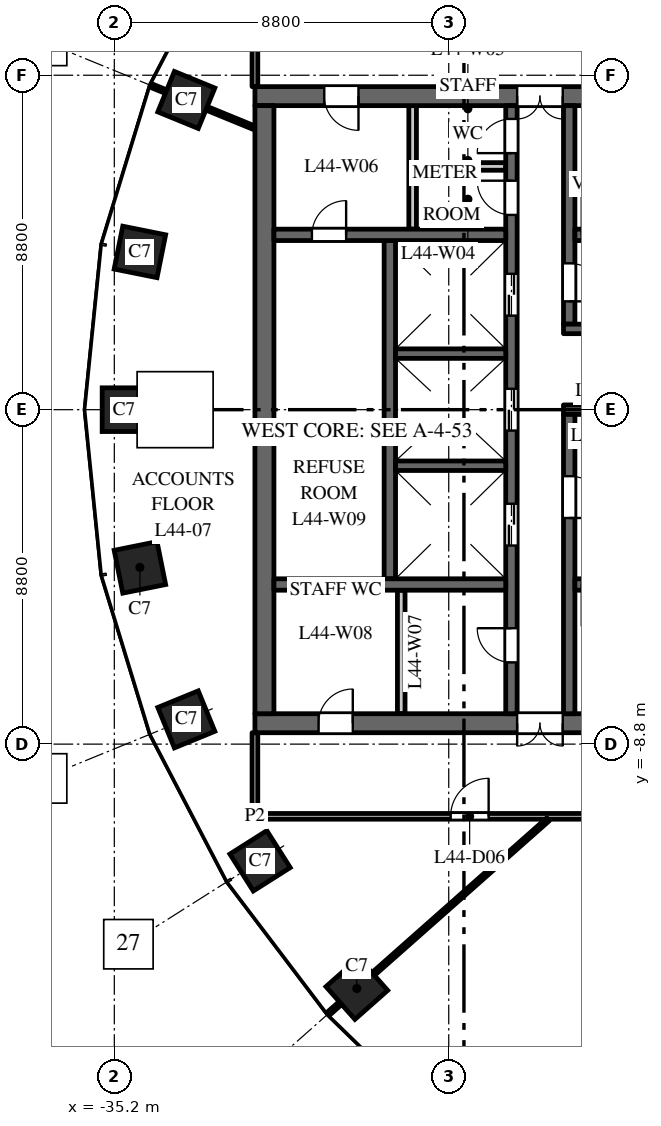
"""IFC4 building model, lengths in metres.
Left out: names, types, materials, properties, quantities, classifications, styles, units other than length and angle.
Written with IfcOpenShell. Run it as: python <this file> out.ifc"""

import sys

from ifc_helpers import new_model, si_unit, direction, frame, frame_2d, origin, origin_2d, place, context, subcontext, project, spatial, rectangle, extrude, element, fill, save


model = new_model("IFC4")
c1 = context("Model", 3, precision=1e-05, world=origin(), true_north=direction((0.0, 1.0)))
c2 = subcontext(c1, "Body", "Model", "MODEL_VIEW")
j1 = project(units=[si_unit("LENGTHUNIT", "METRE"), si_unit("PLANEANGLEUNIT", "RADIAN")], contexts=[c1])
p1 = place(None, origin())
s1 = spatial("IfcSite", under=j1, at=p1, CompositionType="ELEMENT")
p2 = place(p1, origin())
s2 = spatial("IfcBuilding", under=s1, at=p2, CompositionType="ELEMENT")
p3 = place(p2, frame((0.0, 0.0, 190.0)))
s3 = spatial("IfcBuildingStorey", under=s2, at=p3, CompositionType="ELEMENT", Elevation=190.0)
for number, where, z_axis, x_axis in (
    (1, (-33.305, 8.149, 0.0), (0.0, 0.0, 1.0), (-0.379, -0.925, 0.0)),
    (2, (-34.527, 4.151, 0.0), (0.0, 0.0, 1.0), (-0.197, -0.98, 0.0)),
    (3, (-34.945, 0.0, 0.0), (0.0, 0.0, 1.0), (0.0, -1.0, 0.0)),
    (4, (-34.527, -4.151, 0.0), (0.0, 0.0, 1.0), (0.197, -0.98, 0.0)),
    (5, (-33.305, -8.149, 0.0), (0.0, 0.0, 1.0), (0.379, -0.925, 0.0)),
    (6, (-31.365, -11.871, 0.0), (0.0, 0.0, 1.0), (0.535, -0.845, 0.0)),
    (7, (-28.819, -15.23, 0.0), (0.0, 0.0, 1.0), (0.663, -0.749, 0.0)),
):
    element("IfcColumn", number, at=place(p3, frame(where, z_axis=z_axis, x_axis=x_axis)), inside=s3, PredefinedType="COLUMN", context=c2, shape_type="SweptSolid", body=[
        extrude(rectangle(XDim=1.15, YDim=1.15, at=origin_2d()), origin(), (0.0, 0.0, 1.0), 4.0),
    ])
p4 = place(p3, frame((-16.5, 8.25, 0.0), z_axis=(0.0, 0.0, 1.0), x_axis=(-1.0, 0.0, 0.0)))
e8 = element("IfcWall", 8, at=p4, inside=s3, PredefinedType="SHEAR", context=c2, shape_type="SweptSolid", body=[
    extrude(rectangle(XDim=15.0, YDim=0.5, at=frame_2d((7.5, 0.0))), origin(), (0.0, 0.0, 1.0), 3.7),
])
p5 = place(p4, frame((6.9, 0.0, 0.0)))
e9 = element("IfcOpeningElement", 9, at=p5, cuts=e8, PredefinedType="OPENING", context=c2, shape_type="SweptSolid", body=[
    extrude(rectangle(XDim=1.2, YDim=2.1, at=frame_2d((0.6, 1.05))), frame((0.0, 0.26, 0.0), z_axis=(0.0, -1.0, 0.0), x_axis=(1.0, 0.0, 0.0)), (0.0, 0.0, 1.0), 0.52),
])
p6 = place(p4, frame((12.275, 0.0, 0.0)))
e10 = element("IfcOpeningElement", 10, at=p6, cuts=e8, PredefinedType="OPENING", context=c2, shape_type="SweptSolid", body=[
    extrude(rectangle(XDim=0.9, YDim=2.1, at=frame_2d((0.45, 1.05))), frame((0.0, 0.26, 0.0), z_axis=(0.0, -1.0, 0.0), x_axis=(1.0, 0.0, 0.0)), (0.0, 0.0, 1.0), 0.52),
])
p7 = place(p3, frame((-16.5, -8.25, 0.0), z_axis=(0.0, 0.0, 1.0), x_axis=(-1.0, 0.0, 0.0)))
e11 = element("IfcWall", 11, at=p7, inside=s3, PredefinedType="SHEAR", context=c2, shape_type="SweptSolid", body=[
    extrude(rectangle(XDim=15.0, YDim=0.5, at=frame_2d((7.5, 0.0))), origin(), (0.0, 0.0, 1.0), 3.7),
])
p8 = place(p7, frame((6.9, 0.0, 0.0)))
e12 = element("IfcOpeningElement", 12, at=p8, cuts=e11, PredefinedType="OPENING", context=c2, shape_type="SweptSolid", body=[
    extrude(rectangle(XDim=1.2, YDim=2.1, at=frame_2d((0.6, 1.05))), frame((0.0, 0.26, 0.0), z_axis=(0.0, -1.0, 0.0), x_axis=(1.0, 0.0, 0.0)), (0.0, 0.0, 1.0), 0.52),
])
p9 = place(p7, frame((12.425, 0.0, 0.0)))
e13 = element("IfcOpeningElement", 13, at=p9, cuts=e11, PredefinedType="OPENING", context=c2, shape_type="SweptSolid", body=[
    extrude(rectangle(XDim=0.9, YDim=2.1, at=frame_2d((0.45, 1.05))), frame((0.0, 0.26, 0.0), z_axis=(0.0, -1.0, 0.0), x_axis=(1.0, 0.0, 0.0)), (0.0, 0.0, 1.0), 0.52),
])
p10 = place(p3, frame((-27.95, -4.45, 0.0), z_axis=(0.0, 0.0, 1.0), x_axis=(0.0, 1.0, 0.0)))
e14 = element("IfcWall", 14, at=p10, inside=s3, PredefinedType="SHEAR", context=c2, shape_type="SweptSolid", body=[
    extrude(rectangle(XDim=8.9, YDim=0.3, at=frame_2d((4.45, 0.0))), origin(), (0.0, 0.0, 1.0), 3.7),
])
p11 = place(p3, frame((-24.75, -8.0, 0.0), z_axis=(0.0, 0.0, 1.0), x_axis=(0.0, 1.0, 0.0)))
e15 = element("IfcWall", 15, at=p11, inside=s3, PredefinedType="SHEAR", context=c2, shape_type="SweptSolid", body=[
    extrude(rectangle(XDim=16.0, YDim=0.3, at=frame_2d((8.0, 0.0))), origin(), (0.0, 0.0, 1.0), 3.7),
])
p12 = place(p11, frame((4.425, 0.0, 0.0)))
e16 = element("IfcOpeningElement", 16, at=p12, cuts=e15, PredefinedType="OPENING", context=c2, shape_type="SweptSolid", body=[
    extrude(rectangle(XDim=1.1, YDim=2.1, at=frame_2d((0.55, 1.05))), frame((0.0, 0.16, 0.0), z_axis=(0.0, -1.0, 0.0), x_axis=(1.0, 0.0, 0.0)), (0.0, 0.0, 1.0), 0.32),
])
p13 = place(p11, frame((7.45, 0.0, 0.0)))
e17 = element("IfcOpeningElement", 17, at=p13, cuts=e15, PredefinedType="OPENING", context=c2, shape_type="SweptSolid", body=[
    extrude(rectangle(XDim=1.1, YDim=2.1, at=frame_2d((0.55, 1.05))), frame((0.0, 0.16, 0.0), z_axis=(0.0, -1.0, 0.0), x_axis=(1.0, 0.0, 0.0)), (0.0, 0.0, 1.0), 0.32),
])
p14 = place(p11, frame((10.475, 0.0, 0.0)))
e18 = element("IfcOpeningElement", 18, at=p14, cuts=e15, PredefinedType="OPENING", context=c2, shape_type="SweptSolid", body=[
    extrude(rectangle(XDim=1.1, YDim=2.1, at=frame_2d((0.55, 1.05))), frame((0.0, 0.16, 0.0), z_axis=(0.0, -1.0, 0.0), x_axis=(1.0, 0.0, 0.0)), (0.0, 0.0, 1.0), 0.32),
])
p15 = place(p11, frame((13.125, 0.0, 0.0)))
e19 = element("IfcOpeningElement", 19, at=p15, cuts=e15, PredefinedType="OPENING", context=c2, shape_type="SweptSolid", body=[
    extrude(rectangle(XDim=0.9, YDim=2.1, at=frame_2d((0.45, 1.05))), frame((0.0, 0.16, 0.0), z_axis=(0.0, -1.0, 0.0), x_axis=(1.0, 0.0, 0.0)), (0.0, 0.0, 1.0), 0.32),
])
p16 = place(p11, frame((14.75, 0.0, 0.0)))
e20 = element("IfcOpeningElement", 20, at=p16, cuts=e15, PredefinedType="OPENING", context=c2, shape_type="SweptSolid", body=[
    extrude(rectangle(XDim=0.9, YDim=2.1, at=frame_2d((0.45, 1.05))), frame((0.0, 0.16, 0.0), z_axis=(0.0, -1.0, 0.0), x_axis=(1.0, 0.0, 0.0)), (0.0, 0.0, 1.0), 0.32),
])
p17 = place(p11, frame((1.35, 0.0, 0.0)))
e21 = element("IfcOpeningElement", 21, at=p17, cuts=e15, PredefinedType="OPENING", context=c2, shape_type="SweptSolid", body=[
    extrude(rectangle(XDim=0.9, YDim=2.1, at=frame_2d((0.45, 1.05))), frame((0.0, 0.16, 0.0), z_axis=(0.0, -1.0, 0.0), x_axis=(1.0, 0.0, 0.0)), (0.0, 0.0, 1.0), 0.32),
])
p18 = place(p3, frame((-20.1, 0.0, 0.0), z_axis=(0.0, 0.0, 1.0), x_axis=(-1.0, 0.0, 0.0)))
e22 = element("IfcWall", 22, at=p18, inside=s3, PredefinedType="SHEAR", context=c2, shape_type="SweptSolid", body=[
    extrude(rectangle(XDim=3.28, YDim=0.25, at=frame_2d((1.64, 0.0))), origin(), (0.0, 0.0, 1.0), 3.7),
])
p19 = place(p3, frame((-31.25, -8.0, 0.0), z_axis=(0.0, 0.0, 1.0), x_axis=(0.0, 1.0, 0.0)))
e23 = element("IfcWall", 23, at=p19, inside=s3, PredefinedType="SHEAR", context=c2, shape_type="SweptSolid", body=[
    extrude(rectangle(XDim=16.0, YDim=0.5, at=frame_2d((8.0, 0.0))), origin(), (0.0, 0.0, 1.0), 3.7),
])
p20 = place(p3, frame((-24.9, 4.6, 0.0), z_axis=(0.0, 0.0, 1.0), x_axis=(-1.0, 0.0, 0.0)))
e24 = element("IfcWall", 24, at=p20, inside=s3, PredefinedType="SHEAR", context=c2, shape_type="SweptSolid", body=[
    extrude(rectangle(XDim=6.1, YDim=0.3, at=frame_2d((3.05, 0.0))), origin(), (0.0, 0.0, 1.0), 3.7),
])
p21 = place(p20, frame((4.2, 0.0, 0.0)))
e25 = element("IfcOpeningElement", 25, at=p21, cuts=e24, PredefinedType="OPENING", context=c2, shape_type="SweptSolid", body=[
    extrude(rectangle(XDim=0.9, YDim=2.1, at=frame_2d((0.45, 1.05))), frame((0.0, 0.16, 0.0), z_axis=(0.0, -1.0, 0.0), x_axis=(1.0, 0.0, 0.0)), (0.0, 0.0, 1.0), 0.32),
])
for number, where, z_axis, x_axis in (
    (26, (-27.35, 4.75, 0.0), (0.0, 0.0, 1.0), (0.0, 1.0, 0.0)),
    (27, (-27.65, -8.0, 0.0), (0.0, 0.0, 1.0), (0.0, 1.0, 0.0)),
):
    element("IfcWall", number, at=place(p3, frame(where, z_axis=z_axis, x_axis=x_axis)), inside=s3, PredefinedType="PARTITIONING", context=c2, shape_type="SweptSolid", body=[
        extrude(rectangle(XDim=3.25, YDim=0.2, at=frame_2d((1.625, 0.0))), origin(), (0.0, 0.0, 1.0), 3.7),
    ])
p22 = place(p3, frame((-24.9, 6.4, 0.0), z_axis=(0.0, 0.0, 1.0), x_axis=(-1.0, 0.0, 0.0)))
e28 = element("IfcWall", 28, at=p22, inside=s3, PredefinedType="PARTITIONING", context=c2, shape_type="SweptSolid", body=[
    extrude(rectangle(XDim=2.35, YDim=0.2, at=frame_2d((1.175, 0.0))), origin(), (0.0, 0.0, 1.0), 3.7),
])
p23 = place(p3, frame((-24.9, -4.6, 0.0), z_axis=(0.0, 0.0, 1.0), x_axis=(-1.0, 0.0, 0.0)))
e29 = element("IfcWall", 29, at=p23, inside=s3, PredefinedType="SHEAR", context=c2, shape_type="SweptSolid", body=[
    extrude(rectangle(XDim=6.1, YDim=0.3, at=frame_2d((3.05, 0.0))), origin(), (0.0, 0.0, 1.0), 3.7),
])
for number, where, z_axis, x_axis in (
    (30, (-24.9, -1.475, 0.0), (0.0, 0.0, 1.0), (-1.0, 0.0, 0.0)),
    (31, (-24.9, 1.475, 0.0), (0.0, 0.0, 1.0), (-1.0, 0.0, 0.0)),
):
    element("IfcWall", number, at=place(p3, frame(where, z_axis=z_axis, x_axis=x_axis)), inside=s3, PredefinedType="SHEAR", context=c2, shape_type="SweptSolid", body=[
        extrude(rectangle(XDim=2.9, YDim=0.25, at=frame_2d((1.45, 0.0))), origin(), (0.0, 0.0, 1.0), 3.7),
    ])
p24 = place(p3, frame((-23.23, 2.25, 0.0), z_axis=(0.0, 0.0, 1.0), x_axis=(0.0, 1.0, 0.0)))
e32 = element("IfcWall", 32, at=p24, inside=s3, PredefinedType="SHEAR", context=c2, shape_type="SweptSolid", body=[
    extrude(rectangle(XDim=5.75, YDim=0.3, at=frame_2d((2.875, 0.0))), origin(), (0.0, 0.0, 1.0), 3.7),
])
p25 = place(p24, frame((0.6, 0.0, 0.0)))
e33 = element("IfcOpeningElement", 33, at=p25, cuts=e32, PredefinedType="OPENING", context=c2, shape_type="SweptSolid", body=[
    extrude(rectangle(XDim=1.0, YDim=2.1, at=frame_2d((0.5, 1.05))), frame((0.0, 0.16, 0.0), z_axis=(0.0, -1.0, 0.0), x_axis=(1.0, 0.0, 0.0)), (0.0, 0.0, 1.0), 0.32),
])
p26 = place(p3, frame((-23.23, -8.0, 0.0), z_axis=(0.0, 0.0, 1.0), x_axis=(0.0, 1.0, 0.0)))
e34 = element("IfcWall", 34, at=p26, inside=s3, PredefinedType="SHEAR", context=c2, shape_type="SweptSolid", body=[
    extrude(rectangle(XDim=7.875, YDim=0.3, at=frame_2d((3.938, 0.0))), origin(), (0.0, 0.0, 1.0), 3.7),
])
p27 = place(p26, frame((5.15, 0.0, 0.0)))
e35 = element("IfcOpeningElement", 35, at=p27, cuts=e34, PredefinedType="OPENING", context=c2, shape_type="SweptSolid", body=[
    extrude(rectangle(XDim=1.1, YDim=2.1, at=frame_2d((0.55, 1.05))), frame((0.0, 0.16, 0.0), z_axis=(0.0, -1.0, 0.0), x_axis=(1.0, 0.0, 0.0)), (0.0, 0.0, 1.0), 0.32),
])
p28 = place(p3, frame((-16.9, 4.6, 0.0), z_axis=(0.0, 0.0, 1.0), x_axis=(-1.0, 0.0, 0.0)))
e36 = element("IfcWall", 36, at=p28, inside=s3, PredefinedType="SHEAR", context=c2, shape_type="SweptSolid", body=[
    extrude(rectangle(XDim=6.18, YDim=0.3, at=frame_2d((3.09, 0.0))), origin(), (0.0, 0.0, 1.0), 3.7),
])
p29 = place(p28, frame((4.9, 0.0, 0.0)))
e37 = element("IfcOpeningElement", 37, at=p29, cuts=e36, PredefinedType="OPENING", context=c2, shape_type="SweptSolid", body=[
    extrude(rectangle(XDim=1.1, YDim=2.1, at=frame_2d((0.55, 1.05))), frame((0.0, 0.16, 0.0), z_axis=(0.0, -1.0, 0.0), x_axis=(1.0, 0.0, 0.0)), (0.0, 0.0, 1.0), 0.32),
])
p30 = place(p3, frame((-16.9, -4.6, 0.0), z_axis=(0.0, 0.0, 1.0), x_axis=(-1.0, 0.0, 0.0)))
e38 = element("IfcWall", 38, at=p30, inside=s3, PredefinedType="SHEAR", context=c2, shape_type="SweptSolid", body=[
    extrude(rectangle(XDim=6.18, YDim=0.3, at=frame_2d((3.09, 0.0))), origin(), (0.0, 0.0, 1.0), 3.7),
])
p31 = place(p30, frame((4.9, 0.0, 0.0)))
e39 = element("IfcOpeningElement", 39, at=p31, cuts=e38, PredefinedType="OPENING", context=c2, shape_type="SweptSolid", body=[
    extrude(rectangle(XDim=1.1, YDim=2.1, at=frame_2d((0.55, 1.05))), frame((0.0, 0.16, 0.0), z_axis=(0.0, -1.0, 0.0), x_axis=(1.0, 0.0, 0.0)), (0.0, 0.0, 1.0), 0.32),
])
p32 = place(p3, frame((-20.85, 2.125, 0.0), z_axis=(0.0, 0.0, 1.0), x_axis=(-1.0, 0.0, 0.0)))
e40 = element("IfcWall", 40, at=p32, inside=s3, PredefinedType="SHEAR", context=c2, shape_type="SweptSolid", body=[
    extrude(rectangle(XDim=2.53, YDim=0.25, at=frame_2d((1.265, 0.0))), origin(), (0.0, 0.0, 1.0), 3.7),
])
p33 = place(p3, frame((-34.234, 8.53, 0.0), z_axis=(0.0, 0.0, 1.0), x_axis=(0.925344112436, -0.379128307542, 0.0)))
e41 = element("IfcWall", 41, at=p33, inside=s3, PredefinedType="PARTITIONING", context=c2, shape_type="SweptSolid", body=[
    extrude(rectangle(XDim=2.954, YDim=0.1, at=frame_2d((1.477, 0.0))), origin(), (0.0, 0.0, 1.0), 2.9),
])
p34 = place(p3, frame((-31.5, -10.7, 0.0), z_axis=(0.0, 0.0, 1.0), x_axis=(0.0, 1.0, 0.0)))
e42 = element("IfcWall", 42, at=p34, inside=s3, PredefinedType="PARTITIONING", context=c2, shape_type="SweptSolid", body=[
    extrude(rectangle(XDim=2.2, YDim=0.15, at=frame_2d((1.1, 0.0))), origin(), (0.0, 0.0, 1.0), 3.7),
])
p35 = place(p3, frame((-31.5, -10.7, 0.0), z_axis=(0.0, 0.0, 1.0), x_axis=(1.0, 0.0, 0.0)))
e43 = element("IfcWall", 43, at=p35, inside=s3, PredefinedType="PARTITIONING", context=c2, shape_type="SweptSolid", body=[
    extrude(rectangle(XDim=15.0, YDim=0.15, at=frame_2d((7.5, 0.0))), origin(), (0.0, 0.0, 1.0), 3.1),
])
p36 = place(p35, frame((5.15, 0.0, 0.0)))
e44 = element("IfcOpeningElement", 44, at=p36, cuts=e43, PredefinedType="OPENING", context=c2, shape_type="SweptSolid", body=[
    extrude(rectangle(XDim=1.0, YDim=2.1, at=frame_2d((0.5, 1.05))), frame((0.0, 0.085, 0.0), z_axis=(0.0, -1.0, 0.0), x_axis=(1.0, 0.0, 0.0)), (0.0, 0.0, 1.0), 0.17),
])
p37 = place(p35, frame((13.448, 0.0, 0.0)))
e45 = element("IfcOpeningElement", 45, at=p37, cuts=e43, PredefinedType="OPENING", context=c2, shape_type="SweptSolid", body=[
    extrude(rectangle(XDim=1.0, YDim=2.1, at=frame_2d((0.5, 1.05))), frame((0.0, 0.085, 0.0), z_axis=(0.0, -1.0, 0.0), x_axis=(1.0, 0.0, 0.0)), (0.0, 0.0, 1.0), 0.17),
])
p38 = place(p3, frame((-31.5, 8.5, 0.0), z_axis=(0.0, 0.0, 1.0), x_axis=(0.0, 1.0, 0.0)))
e46 = element("IfcWall", 46, at=p38, inside=s3, PredefinedType="PARTITIONING", context=c2, shape_type="SweptSolid", body=[
    extrude(rectangle(XDim=2.2, YDim=0.15, at=frame_2d((1.1, 0.0))), origin(), (0.0, 0.0, 1.0), 3.7),
])
p39 = place(p3, frame((-29.569, -15.895, 0.0), z_axis=(0.0, 0.0, 1.0), x_axis=(0.748985701008, 0.662586160198, 0.0)))
e47 = element("IfcWall", 47, at=p39, inside=s3, PredefinedType="PARTITIONING", context=c2, shape_type="SweptSolid", body=[
    extrude(rectangle(XDim=7.723, YDim=0.1, at=frame_2d((3.861, 0.0))), origin(), (0.0, 0.0, 1.0), 2.9),
])
p40 = place(p12, origin())
e48 = element("IfcDoor", 48, at=p40, inside=s3, OperationType="DOUBLE_DOOR_SLIDING", PredefinedType="DOOR", context=c2, shape_type="SweptSolid", body=[
    extrude(rectangle(XDim=1.1, YDim=2.1, at=frame_2d((0.55, 1.05))), frame((0.0, 0.025, 0.0), z_axis=(0.0, -1.0, 0.0), x_axis=(1.0, 0.0, 0.0)), (0.0, 0.0, 1.0), 0.05),
])
fill(e16, e48)
p41 = place(p13, origin())
e49 = element("IfcDoor", 49, at=p41, inside=s3, OperationType="DOUBLE_DOOR_SLIDING", PredefinedType="DOOR", context=c2, shape_type="SweptSolid", body=[
    extrude(rectangle(XDim=1.1, YDim=2.1, at=frame_2d((0.55, 1.05))), frame((0.0, 0.025, 0.0), z_axis=(0.0, -1.0, 0.0), x_axis=(1.0, 0.0, 0.0)), (0.0, 0.0, 1.0), 0.05),
])
fill(e17, e49)
p42 = place(p14, origin())
e50 = element("IfcDoor", 50, at=p42, inside=s3, OperationType="DOUBLE_DOOR_SLIDING", PredefinedType="DOOR", context=c2, shape_type="SweptSolid", body=[
    extrude(rectangle(XDim=1.1, YDim=2.1, at=frame_2d((0.55, 1.05))), frame((0.0, 0.025, 0.0), z_axis=(0.0, -1.0, 0.0), x_axis=(1.0, 0.0, 0.0)), (0.0, 0.0, 1.0), 0.05),
])
fill(e18, e50)
p43 = place(p29, origin())
e51 = element("IfcDoor", 51, at=p43, inside=s3, OperationType="SINGLE_SWING_RIGHT", PredefinedType="DOOR", context=c2, shape_type="SweptSolid", body=[
    extrude(rectangle(XDim=1.1, YDim=2.1, at=frame_2d((0.55, 1.05))), frame((0.0, 0.025, 0.0), z_axis=(0.0, -1.0, 0.0), x_axis=(1.0, 0.0, 0.0)), (0.0, 0.0, 1.0), 0.05),
])
fill(e37, e51)
p44 = place(p31, origin())
e52 = element("IfcDoor", 52, at=p44, inside=s3, OperationType="SINGLE_SWING_LEFT", PredefinedType="DOOR", context=c2, shape_type="SweptSolid", body=[
    extrude(rectangle(XDim=1.1, YDim=2.1, at=frame_2d((0.55, 1.05))), frame((0.0, 0.025, 0.0), z_axis=(0.0, -1.0, 0.0), x_axis=(1.0, 0.0, 0.0)), (0.0, 0.0, 1.0), 0.05),
])
fill(e39, e52)
p45 = place(p27, origin())
e53 = element("IfcDoor", 53, at=p45, inside=s3, OperationType="SINGLE_SWING_LEFT", PredefinedType="DOOR", context=c2, shape_type="SweptSolid", body=[
    extrude(rectangle(XDim=1.1, YDim=2.1, at=frame_2d((0.55, 1.05))), frame((0.0, 0.025, 0.0), z_axis=(0.0, -1.0, 0.0), x_axis=(1.0, 0.0, 0.0)), (0.0, 0.0, 1.0), 0.05),
])
fill(e35, e53)
p46 = place(p25, origin())
e54 = element("IfcDoor", 54, at=p46, inside=s3, OperationType="SINGLE_SWING_LEFT", PredefinedType="DOOR", context=c2, shape_type="SweptSolid", body=[
    extrude(rectangle(XDim=1.0, YDim=2.1, at=frame_2d((0.5, 1.05))), frame((0.0, 0.025, 0.0), z_axis=(0.0, -1.0, 0.0), x_axis=(1.0, 0.0, 0.0)), (0.0, 0.0, 1.0), 0.05),
])
fill(e33, e54)
p47 = place(p5, origin())
e55 = element("IfcDoor", 55, at=p47, inside=s3, OperationType="DOUBLE_DOOR_DOUBLE_SWING", PredefinedType="DOOR", context=c2, shape_type="SweptSolid", body=[
    extrude(rectangle(XDim=1.2, YDim=2.1, at=frame_2d((0.6, 1.05))), frame((0.0, 0.025, 0.0), z_axis=(0.0, -1.0, 0.0), x_axis=(1.0, 0.0, 0.0)), (0.0, 0.0, 1.0), 0.05),
])
fill(e9, e55)
p48 = place(p8, origin())
e56 = element("IfcDoor", 56, at=p48, inside=s3, OperationType="DOUBLE_DOOR_DOUBLE_SWING", PredefinedType="DOOR", context=c2, shape_type="SweptSolid", body=[
    extrude(rectangle(XDim=1.2, YDim=2.1, at=frame_2d((0.6, 1.05))), frame((0.0, 0.025, 0.0), z_axis=(0.0, -1.0, 0.0), x_axis=(1.0, 0.0, 0.0)), (0.0, 0.0, 1.0), 0.05),
])
fill(e12, e56)
p49 = place(p15, origin())
e57 = element("IfcDoor", 57, at=p49, inside=s3, OperationType="SINGLE_SWING_LEFT", PredefinedType="DOOR", context=c2, shape_type="SweptSolid", body=[
    extrude(rectangle(XDim=0.9, YDim=2.1, at=frame_2d((0.45, 1.05))), frame((0.0, 0.025, 0.0), z_axis=(0.0, -1.0, 0.0), x_axis=(1.0, 0.0, 0.0)), (0.0, 0.0, 1.0), 0.05),
])
fill(e19, e57)
p50 = place(p16, origin())
e58 = element("IfcDoor", 58, at=p50, inside=s3, OperationType="SINGLE_SWING_RIGHT", PredefinedType="DOOR", context=c2, shape_type="SweptSolid", body=[
    extrude(rectangle(XDim=0.9, YDim=2.1, at=frame_2d((0.45, 1.05))), frame((0.0, 0.025, 0.0), z_axis=(0.0, -1.0, 0.0), x_axis=(1.0, 0.0, 0.0)), (0.0, 0.0, 1.0), 0.05),
])
fill(e20, e58)
p51 = place(p6, origin())
e59 = element("IfcDoor", 59, at=p51, inside=s3, OperationType="SINGLE_SWING_RIGHT", PredefinedType="DOOR", context=c2, shape_type="SweptSolid", body=[
    extrude(rectangle(XDim=0.9, YDim=2.1, at=frame_2d((0.45, 1.05))), frame((0.0, 0.025, 0.0), z_axis=(0.0, -1.0, 0.0), x_axis=(1.0, 0.0, 0.0)), (0.0, 0.0, 1.0), 0.05),
])
fill(e10, e59)
p52 = place(p17, origin())
e60 = element("IfcDoor", 60, at=p52, inside=s3, OperationType="SINGLE_SWING_LEFT", PredefinedType="DOOR", context=c2, shape_type="SweptSolid", body=[
    extrude(rectangle(XDim=0.9, YDim=2.1, at=frame_2d((0.45, 1.05))), frame((0.0, 0.025, 0.0), z_axis=(0.0, -1.0, 0.0), x_axis=(1.0, 0.0, 0.0)), (0.0, 0.0, 1.0), 0.05),
])
fill(e21, e60)
p53 = place(p9, origin())
e61 = element("IfcDoor", 61, at=p53, inside=s3, OperationType="SINGLE_SWING_LEFT", PredefinedType="DOOR", context=c2, shape_type="SweptSolid", body=[
    extrude(rectangle(XDim=0.9, YDim=2.1, at=frame_2d((0.45, 1.05))), frame((0.0, 0.025, 0.0), z_axis=(0.0, -1.0, 0.0), x_axis=(1.0, 0.0, 0.0)), (0.0, 0.0, 1.0), 0.05),
])
fill(e13, e61)
p54 = place(p21, origin())
e62 = element("IfcDoor", 62, at=p54, inside=s3, OperationType="SINGLE_SWING_LEFT", PredefinedType="DOOR", context=c2, shape_type="SweptSolid", body=[
    extrude(rectangle(XDim=0.9, YDim=2.1, at=frame_2d((0.45, 1.05))), frame((0.0, 0.025, 0.0), z_axis=(0.0, -1.0, 0.0), x_axis=(1.0, 0.0, 0.0)), (0.0, 0.0, 1.0), 0.05),
])
fill(e25, e62)
p55 = place(p36, origin())
e63 = element("IfcDoor", 63, at=p55, inside=s3, OperationType="SINGLE_SWING_RIGHT", PredefinedType="DOOR", context=c2, shape_type="SweptSolid", body=[
    extrude(rectangle(XDim=1.0, YDim=2.1, at=frame_2d((0.5, 1.05))), frame((0.0, 0.025, 0.0), z_axis=(0.0, -1.0, 0.0), x_axis=(1.0, 0.0, 0.0)), (0.0, 0.0, 1.0), 0.05),
])
fill(e44, e63)
save(model, sys.argv[1])
